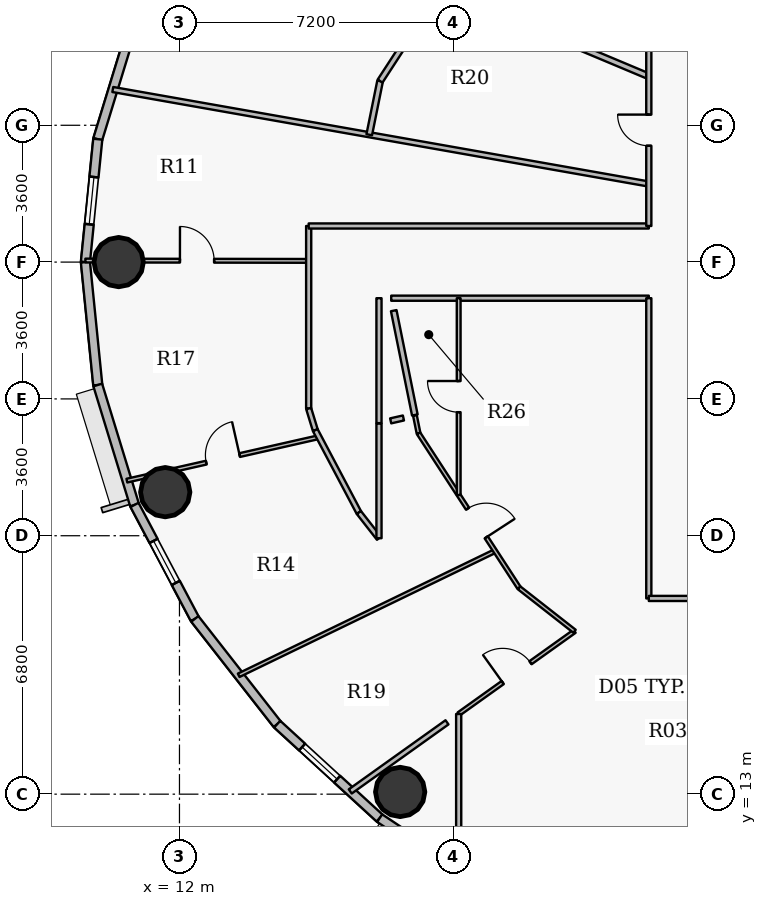
"""IFC4 building model, lengths in metres.
Left out: names, types, materials, properties, quantities, classifications, styles, units other than length and angle.
Written with IfcOpenShell. Run it as: python <this file> out.ifc"""

import sys

from ifc_helpers import new_model, si_unit, direction, frame, frame_2d, origin, origin_2d, place, context, subcontext, project, spatial, rectangle, hollow_circle, extrude, source, transform, mapped, element, fill, save


model = new_model("IFC4")
c1 = context("Model", 3, precision=1e-05, world=origin(), true_north=direction((0.0, 1.0)))
c2 = subcontext(c1, "Body", "Model", "MODEL_VIEW")
j1 = project(units=[si_unit("LENGTHUNIT", "METRE"), si_unit("PLANEANGLEUNIT", "RADIAN")], contexts=[c1])
p1 = place(None, origin())
s1 = spatial("IfcSite", under=j1, at=p1, CompositionType="ELEMENT")
p2 = place(p1, origin())
s2 = spatial("IfcBuilding", under=s1, at=p2, CompositionType="ELEMENT")
p3 = place(p2, frame((0.0, 0.0, 186.15)))
s3 = spatial("IfcBuildingStorey", under=s2, at=p3, CompositionType="ELEMENT", Elevation=186.15)
for number, where, z_axis, x_axis in (
    (1, (10.4, 27.0, 0.0), (0.0, 0.0, 1.0), (1.0, 0.0, 0.0)),
    (2, (11.625, 20.947, 0.0), (0.0, 0.0, 1.0), (1.0, 0.0, 0.0)),
    (3, (17.808, 13.058, 0.0), (0.0, 0.0, 1.0), (1.0, 0.0, 0.0)),
):
    element("IfcColumn", number, at=place(p3, frame(where, z_axis=z_axis, x_axis=x_axis)), inside=s3, PredefinedType="COLUMN", context=c2, shape_type="SweptSolid", body=[
        extrude(hollow_circle(Radius=0.65, WallThickness=0.04, at=origin_2d()), origin(), (0.0, 0.0, 1.0), 3.75),
    ])
p4 = place(p3, frame((9.85, 30.234, 0.0), z_axis=(0.0, 0.0, 1.0), x_axis=(0.293097995113, 0.956082405058, 0.0)))
e4 = element("IfcWall", 4, at=p4, inside=s3, PredefinedType="SOLIDWALL", context=c2, shape_type="SweptSolid", body=[
    extrude(rectangle(XDim=3.3, YDim=0.24, at=frame_2d((1.65, 0.0))), origin(), (0.0, 0.0, 1.0), 3.5),
])
p5 = place(p3, frame((9.525, 27.0, 0.0), z_axis=(0.0, 0.0, 1.0), x_axis=(0.100061534614, 0.994981250723, 0.0)))
e5 = element("IfcWall", 5, at=p5, inside=s3, PredefinedType="SOLIDWALL", context=c2, shape_type="SweptSolid", body=[
    extrude(rectangle(XDim=3.25, YDim=0.24, at=frame_2d((1.625, 0.0))), origin(), (0.0, 0.0, 1.0), 3.5),
])
p6 = place(p5, frame((1.0, 0.0, 0.9)))
e6 = element("IfcOpeningElement", 6, at=p6, cuts=e5, PredefinedType="OPENING", context=c2, shape_type="SweptSolid", body=[
    extrude(rectangle(XDim=1.25, YDim=1.65, at=origin_2d()), frame((0.625, 0.13, 0.825), z_axis=(0.0, -1.0, 0.0), x_axis=(1.0, 0.0, 0.0)), (0.0, 0.0, 1.0), 0.26),
])
p7 = place(p3, frame((9.85, 23.766, 0.0), z_axis=(0.0, 0.0, 1.0), x_axis=(-0.100061534614, 0.994981250723, 0.0)))
e7 = element("IfcWall", 7, at=p7, inside=s3, PredefinedType="SOLIDWALL", context=c2, shape_type="SweptSolid", body=[
    extrude(rectangle(XDim=3.25, YDim=0.24, at=frame_2d((1.625, 0.0))), origin(), (0.0, 0.0, 1.0), 3.5),
])
p8 = place(p3, frame((10.817, 20.611, 0.0), z_axis=(0.0, 0.0, 1.0), x_axis=(-0.293097995113, 0.956082405058, 0.0)))
e8 = element("IfcWall", 8, at=p8, inside=s3, PredefinedType="SOLIDWALL", context=c2, shape_type="SweptSolid", body=[
    extrude(rectangle(XDim=3.3, YDim=0.24, at=frame_2d((1.65, 0.0))), origin(), (0.0, 0.0, 1.0), 3.5),
])
p9 = place(p3, frame((12.404, 17.612, 0.0), z_axis=(0.0, 0.0, 1.0), x_axis=(-0.467586874938, 0.88394712194, 0.0)))
e9 = element("IfcWall", 9, at=p9, inside=s3, PredefinedType="SOLIDWALL", context=c2, shape_type="SweptSolid", body=[
    extrude(rectangle(XDim=3.393, YDim=0.24, at=frame_2d((1.697, 0.0))), origin(), (0.0, 0.0, 1.0), 3.5),
])
p10 = place(p9, frame((1.072, 0.0, 0.9)))
e10 = element("IfcOpeningElement", 10, at=p10, cuts=e9, PredefinedType="OPENING", context=c2, shape_type="SweptSolid", body=[
    extrude(rectangle(XDim=1.25, YDim=1.65, at=origin_2d()), frame((0.625, 0.13, 0.825), z_axis=(0.0, -1.0, 0.0), x_axis=(1.0, 0.0, 0.0)), (0.0, 0.0, 1.0), 0.26),
])
p11 = place(p3, frame((14.572, 14.842, 0.0), z_axis=(0.0, 0.0, 1.0), x_axis=(-0.616287674549, 0.787521112224, 0.0)))
e11 = element("IfcWall", 11, at=p11, inside=s3, PredefinedType="SOLIDWALL", context=c2, shape_type="SweptSolid", body=[
    extrude(rectangle(XDim=3.517, YDim=0.24, at=frame_2d((1.759, 0.0))), origin(), (0.0, 0.0, 1.0), 3.5),
])
p12 = place(p3, frame((17.268, 12.369, 0.0), z_axis=(0.0, 0.0, 1.0), x_axis=(-0.737076565834, 0.675809245349, 0.0)))
e12 = element("IfcWall", 12, at=p12, inside=s3, PredefinedType="SOLIDWALL", context=c2, shape_type="SweptSolid", body=[
    extrude(rectangle(XDim=3.658, YDim=0.24, at=frame_2d((1.829, 0.0))), origin(), (0.0, 0.0, 1.0), 3.5),
])
p13 = place(p12, frame((1.518, 0.0, 0.9)))
e13 = element("IfcOpeningElement", 13, at=p13, cuts=e12, PredefinedType="OPENING", context=c2, shape_type="SweptSolid", body=[
    extrude(rectangle(XDim=1.25, YDim=1.65, at=origin_2d()), frame((0.625, 0.13, 0.825), z_axis=(0.0, -1.0, 0.0), x_axis=(1.0, 0.0, 0.0)), (0.0, 0.0, 1.0), 0.26),
])
p14 = place(p3, frame((20.427, 10.257, 0.0), z_axis=(0.0, 0.0, 1.0), x_axis=(-0.831228998277, 0.555930168657, 0.0)))
e14 = element("IfcWall", 14, at=p14, inside=s3, PredefinedType="SOLIDWALL", context=c2, shape_type="SweptSolid", body=[
    extrude(rectangle(XDim=3.8, YDim=0.24, at=frame_2d((1.9, 0.0))), origin(), (0.0, 0.0, 1.0), 3.5),
])
p15 = place(p3, frame((9.524, 27.041, 0.0), z_axis=(0.0, 0.0, 1.0), x_axis=(0.999998818241, -0.001537373012, 0.0)))
e15 = element("IfcWall", 15, at=p15, inside=s3, PredefinedType="PARTITIONING", context=c2, shape_type="SweptSolid", body=[
    extrude(rectangle(XDim=5.876, YDim=0.1, at=frame_2d((2.938, 0.0))), origin(), (0.0, 0.0, 1.0), 2.935),
])
p16 = place(p15, frame((2.488, 0.0, 0.0)))
e16 = element("IfcOpeningElement", 16, at=p16, cuts=e15, PredefinedType="OPENING", context=c2, shape_type="SweptSolid", body=[
    extrude(rectangle(XDim=0.9, YDim=2.1, at=origin_2d()), frame((0.45, 0.06, 1.05), z_axis=(0.0, -1.0, 0.0), x_axis=(1.0, 0.0, 0.0)), (0.0, 0.0, 1.0), 0.12),
])
p17 = place(p3, frame((10.246, 31.541, 0.0), z_axis=(0.0, 0.0, 1.0), x_axis=(0.984807060168, -0.173652106936, 0.0)))
e17 = element("IfcWall", 17, at=p17, inside=s3, PredefinedType="PARTITIONING", context=c2, shape_type="SweptSolid", body=[
    extrude(rectangle(XDim=14.322, YDim=0.135, at=frame_2d((7.161, 0.0))), origin(), (0.0, 0.0, 1.0), 2.935),
])
p18 = place(p3, frame((10.616, 21.25, 0.0), z_axis=(0.0, 0.0, 1.0), x_axis=(0.975289939743, 0.220928797208, 0.0)))
e18 = element("IfcWall", 18, at=p18, inside=s3, PredefinedType="PARTITIONING", context=c2, shape_type="SweptSolid", body=[
    extrude(rectangle(XDim=5.183, YDim=0.1, at=frame_2d((2.591, 0.0))), origin(), (0.0, 0.0, 1.0), 2.935),
])
p19 = place(p18, frame((2.141, 0.0, 0.0)))
e19 = element("IfcOpeningElement", 19, at=p19, cuts=e18, PredefinedType="OPENING", context=c2, shape_type="SweptSolid", body=[
    extrude(rectangle(XDim=0.9, YDim=2.1, at=origin_2d()), frame((0.45, 0.06, 1.05), z_axis=(0.0, -1.0, 0.0), x_axis=(1.0, 0.0, 0.0)), (0.0, 0.0, 1.0), 0.12),
])
p20 = place(p3, frame((12.7, 36.775, 0.0), z_axis=(0.0, 0.0, 1.0), x_axis=(0.922134788074, -0.386868753745, 0.0)))
e20 = element("IfcWall", 20, at=p20, inside=s3, PredefinedType="PARTITIONING", context=c2, shape_type="SweptSolid", body=[
    extrude(rectangle(XDim=12.633, YDim=0.15, at=frame_2d((6.317, 0.0))), origin(), (0.0, 0.0, 1.0), 2.935),
])
p21 = place(p20, frame((2.834, 0.0, 0.0)))
e21 = element("IfcOpeningElement", 21, at=p21, cuts=e20, PredefinedType="OPENING", context=c2, shape_type="SweptSolid", body=[
    extrude(rectangle(XDim=1.05, YDim=2.15, at=origin_2d()), frame((0.525, 0.085, 1.075), z_axis=(0.0, -1.0, 0.0), x_axis=(1.0, 0.0, 0.0)), (0.0, 0.0, 1.0), 0.17),
])
p22 = place(p3, frame((13.559, 16.128, 0.0), z_axis=(0.0, 0.0, 1.0), x_axis=(0.899957370901, 0.43597790146, 0.0)))
e22 = element("IfcWall", 22, at=p22, inside=s3, PredefinedType="PARTITIONING", context=c2, shape_type="SweptSolid", body=[
    extrude(rectangle(XDim=7.498, YDim=0.1, at=frame_2d((3.749, 0.0))), origin(), (0.0, 0.0, 1.0), 2.935),
])
p23 = place(p3, frame((15.4, 23.146, 0.0), z_axis=(0.0, 0.0, 1.0), x_axis=(0.0, 1.0, 0.0)))
e23 = element("IfcWall", 23, at=p23, inside=s3, PredefinedType="PARTITIONING", context=c2, shape_type="SweptSolid", body=[
    extrude(rectangle(XDim=4.804, YDim=0.135, at=frame_2d((2.402, 0.0))), origin(), (0.0, 0.0, 1.0), 2.935),
])
p24 = place(p3, frame((15.4, 23.146, 0.0), z_axis=(0.0, 0.0, 1.0), x_axis=(0.293335154151, -0.956009669061, 0.0)))
e24 = element("IfcWall", 24, at=p24, inside=s3, PredefinedType="PARTITIONING", context=c2, shape_type="SweptSolid", body=[
    extrude(rectangle(XDim=0.594, YDim=0.135, at=frame_2d((0.297, 0.0))), origin(), (0.0, 0.0, 1.0), 3.5),
])
p25 = place(p3, frame((15.4, 27.95, 0.0), z_axis=(0.0, 0.0, 1.0), x_axis=(1.0, 0.0, 0.0)))
e25 = element("IfcWall", 25, at=p25, inside=s3, PredefinedType="PARTITIONING", context=c2, shape_type="SweptSolid", body=[
    extrude(rectangle(XDim=8.95, YDim=0.135, at=frame_2d((4.475, 0.0))), origin(), (0.0, 0.0, 1.0), 3.5),
])
p26 = place(p3, frame((15.574, 22.578, 0.0), z_axis=(0.0, 0.0, 1.0), x_axis=(0.467613130075, -0.883933233102, 0.0)))
e26 = element("IfcWall", 26, at=p26, inside=s3, PredefinedType="PARTITIONING", context=c2, shape_type="SweptSolid", body=[
    extrude(rectangle(XDim=2.451, YDim=0.135, at=frame_2d((1.226, 0.0))), origin(), (0.0, 0.0, 1.0), 2.935),
])
p27 = place(p3, frame((16.72, 20.411, 0.0), z_axis=(0.0, 0.0, 1.0), x_axis=(0.616377221056, -0.787451027914, 0.0)))
e27 = element("IfcWall", 27, at=p27, inside=s3, PredefinedType="PARTITIONING", context=c2, shape_type="SweptSolid", body=[
    extrude(rectangle(XDim=0.859, YDim=0.135, at=frame_2d((0.43, 0.0))), origin(), (0.0, 0.0, 1.0), 3.5),
])
p28 = place(p3, frame((16.994, 30.351, 0.0), z_axis=(0.0, 0.0, 1.0), x_axis=(0.198136589313, 0.98017441916, 0.0)))
e28 = element("IfcWall", 28, at=p28, inside=s3, PredefinedType="PARTITIONING", context=c2, shape_type="SweptSolid", body=[
    extrude(rectangle(XDim=1.44, YDim=0.15, at=frame_2d((0.72, 0.0))), origin(), (0.0, 0.0, 1.0), 3.5),
])
p29 = place(p3, frame((17.25, 19.734, 0.0), z_axis=(0.0, 0.0, 1.0), x_axis=(0.0, 1.0, 0.0)))
e29 = element("IfcWall", 29, at=p29, inside=s3, PredefinedType="PARTITIONING", context=c2, shape_type="SweptSolid", body=[
    extrude(rectangle(XDim=3.018, YDim=0.135, at=frame_2d((1.509, 0.0))), origin(), (0.0, 0.0, 1.0), 2.935),
])
p30 = place(p3, frame((17.279, 31.763, 0.0), z_axis=(0.0, 0.0, 1.0), x_axis=(0.545388220317, 0.8381835653, 0.0)))
e30 = element("IfcWall", 30, at=p30, inside=s3, PredefinedType="PARTITIONING", context=c2, shape_type="SweptSolid", body=[
    extrude(rectangle(XDim=2.897, YDim=0.15, at=frame_2d((1.448, 0.0))), origin(), (0.0, 0.0, 1.0), 2.935),
])
p31 = place(p3, frame((17.572, 26.05, 0.0), z_axis=(0.0, 0.0, 1.0), x_axis=(1.0, 0.0, 0.0)))
e31 = element("IfcWall", 31, at=p31, inside=s3, PredefinedType="PARTITIONING", context=c2, shape_type="SweptSolid", body=[
    extrude(rectangle(XDim=6.778, YDim=0.135, at=frame_2d((3.389, 0.0))), origin(), (0.0, 0.0, 1.0), 3.5),
])
p32 = place(p3, frame((18.196, 22.967, 0.0), z_axis=(0.0, 0.0, 1.0), x_axis=(0.197965751338, -0.980208937573, 0.0)))
e32 = element("IfcWall", 32, at=p32, inside=s3, PredefinedType="PARTITIONING", context=c2, shape_type="SweptSolid", body=[
    extrude(rectangle(XDim=0.482, YDim=0.1, at=frame_2d((0.241, 0.0))), origin(), (0.0, 0.0, 1.0), 2.935),
])
p33 = place(p3, frame((18.291, 22.494, 0.0), z_axis=(0.0, 0.0, 1.0), x_axis=(0.545382906853, -0.838187022634, 0.0)))
e33 = element("IfcWall", 33, at=p33, inside=s3, PredefinedType="PARTITIONING", context=c2, shape_type="SweptSolid", body=[
    extrude(rectangle(XDim=4.849, YDim=0.1, at=frame_2d((2.425, 0.0))), origin(), (0.0, 0.0, 1.0), 2.935),
])
p34 = place(p33, frame((2.365, 0.0, 0.0)))
e34 = element("IfcOpeningElement", 34, at=p34, cuts=e33, PredefinedType="OPENING", context=c2, shape_type="SweptSolid", body=[
    extrude(rectangle(XDim=0.9, YDim=2.1, at=origin_2d()), frame((0.45, 0.06, 1.05), z_axis=(0.0, -1.0, 0.0), x_axis=(1.0, 0.0, 0.0)), (0.0, 0.0, 1.0), 0.12),
])
p35 = place(p3, frame((19.347, 15.11, 0.0), z_axis=(0.0, 0.0, 1.0), x_axis=(0.813856749582, 0.581065565285, 0.0)))
e35 = element("IfcWall", 35, at=p35, inside=s3, PredefinedType="PARTITIONING", context=c2, shape_type="SweptSolid", body=[
    extrude(rectangle(XDim=3.746, YDim=0.1, at=frame_2d((1.873, 0.0))), origin(), (0.0, 0.0, 1.0), 3.5),
])
p36 = place(p35, frame((1.423, 0.0, 0.0)))
e36 = element("IfcOpeningElement", 36, at=p36, cuts=e35, PredefinedType="OPENING", context=c2, shape_type="SweptSolid", body=[
    extrude(rectangle(XDim=0.9, YDim=2.1, at=origin_2d()), frame((0.45, 0.06, 1.05), z_axis=(0.0, -1.0, 0.0), x_axis=(1.0, 0.0, 0.0)), (0.0, 0.0, 1.0), 0.12),
])
p37 = place(p3, frame((19.347, 20.871, 0.0), z_axis=(0.0, 0.0, 1.0), x_axis=(0.0, 1.0, 0.0)))
e37 = element("IfcWall", 37, at=p37, inside=s3, PredefinedType="PARTITIONING", context=c2, shape_type="SweptSolid", body=[
    extrude(rectangle(XDim=5.179, YDim=0.1, at=frame_2d((2.589, 0.0))), origin(), (0.0, 0.0, 1.0), 2.935),
])
p38 = place(p37, frame((2.179, 0.0, 0.0)))
e38 = element("IfcOpeningElement", 38, at=p38, cuts=e37, PredefinedType="OPENING", context=c2, shape_type="SweptSolid", body=[
    extrude(rectangle(XDim=0.82, YDim=2.1, at=origin_2d()), frame((0.41, 0.06, 1.05), z_axis=(0.0, -1.0, 0.0), x_axis=(1.0, 0.0, 0.0)), (0.0, 0.0, 1.0), 0.12),
])
p39 = place(p3, frame((20.936, 18.429, 0.0), z_axis=(0.0, 0.0, 1.0), x_axis=(0.787377174631, -0.616471560472, 0.0)))
e39 = element("IfcWall", 39, at=p39, inside=s3, PredefinedType="PARTITIONING", context=c2, shape_type="SweptSolid", body=[
    extrude(rectangle(XDim=1.854, YDim=0.1, at=frame_2d((0.927, 0.0))), origin(), (0.0, 0.0, 1.0), 3.5),
])
p40 = place(p3, frame((24.35, 18.15, 0.0), z_axis=(0.0, 0.0, 1.0), x_axis=(0.0, 1.0, 0.0)))
e40 = element("IfcWall", 40, at=p40, inside=s3, PredefinedType="PARTITIONING", context=c2, shape_type="SweptSolid", body=[
    extrude(rectangle(XDim=7.9, YDim=0.135, at=frame_2d((3.95, 0.0))), origin(), (0.0, 0.0, 1.0), 2.935),
])
p41 = place(p3, frame((24.35, 18.15, 0.0), z_axis=(0.0, 0.0, 1.0), x_axis=(1.0, 0.0, 0.0)))
e41 = element("IfcWall", 41, at=p41, inside=s3, PredefinedType="PARTITIONING", context=c2, shape_type="SweptSolid", body=[
    extrude(rectangle(XDim=9.109, YDim=0.135, at=frame_2d((4.554, 0.0))), origin(), (0.0, 0.0, 1.0), 2.935),
])
p42 = place(p41, frame((4.054, 0.0, 0.0)))
e42 = element("IfcOpeningElement", 42, at=p42, cuts=e41, PredefinedType="OPENING", context=c2, shape_type="SweptSolid", body=[
    extrude(rectangle(XDim=1.0, YDim=2.15, at=origin_2d()), frame((0.5, 0.078, 1.075), z_axis=(0.0, -1.0, 0.0), x_axis=(1.0, 0.0, 0.0)), (0.0, 0.0, 1.0), 0.155),
])
p43 = place(p3, frame((24.35, 27.95, 0.0), z_axis=(0.0, 0.0, 1.0), x_axis=(0.0, 1.0, 0.0)))
e43 = element("IfcWall", 43, at=p43, inside=s3, PredefinedType="PARTITIONING", context=c2, shape_type="SweptSolid", body=[
    extrude(rectangle(XDim=7.9, YDim=0.135, at=frame_2d((3.95, 0.0))), origin(), (0.0, 0.0, 1.0), 2.935),
])
p44 = place(p43, frame((2.111, 0.0, 0.0)))
e44 = element("IfcOpeningElement", 44, at=p44, cuts=e43, PredefinedType="OPENING", context=c2, shape_type="SweptSolid", body=[
    extrude(rectangle(XDim=0.82, YDim=2.1, at=origin_2d()), frame((0.41, 0.078, 1.05), z_axis=(0.0, -1.0, 0.0), x_axis=(1.0, 0.0, 0.0)), (0.0, 0.0, 1.0), 0.155),
])
p45 = place(p3, frame((24.497, 8.38, 0.0), z_axis=(0.0, 0.0, 1.0), x_axis=(0.525599261466, 0.850732282417, 0.0)))
e45 = element("IfcWall", 45, at=p45, inside=s3, PredefinedType="PARTITIONING", context=c2, shape_type="SweptSolid", body=[
    extrude(rectangle(XDim=6.645, YDim=0.1, at=frame_2d((3.322, 0.0))), origin(), (0.0, 0.0, 1.0), 2.935),
])
p46 = place(p45, frame((2.872, 0.0, 0.0)))
e46 = element("IfcOpeningElement", 46, at=p46, cuts=e45, PredefinedType="OPENING", context=c2, shape_type="SweptSolid", body=[
    extrude(rectangle(XDim=0.9, YDim=2.1, at=origin_2d()), frame((0.45, 0.06, 1.05), z_axis=(0.0, -1.0, 0.0), x_axis=(1.0, 0.0, 0.0)), (0.0, 0.0, 1.0), 0.12),
])
p47 = place(p3, frame((17.25, 26.05, 0.0), z_axis=(0.0, 0.0, 1.0), x_axis=(0.0, -1.0, 0.0)))
e47 = element("IfcWall", 47, at=p47, inside=s3, PredefinedType="PARTITIONING", context=c2, shape_type="SweptSolid", body=[
    extrude(rectangle(XDim=3.288, YDim=0.135, at=frame_2d((1.644, 0.0))), origin(), (0.0, 0.0, 1.0), 3.125),
])
p48 = place(p3, frame((19.347, 10.973, 0.0), z_axis=(0.0, 0.0, 1.0), x_axis=(0.0, 1.0, 0.0)))
e48 = element("IfcWall", 48, at=p48, inside=s3, PredefinedType="PARTITIONING", context=c2, shape_type="SweptSolid", body=[
    extrude(rectangle(XDim=4.137, YDim=0.135, at=frame_2d((2.068, 0.0))), origin(), (0.0, 0.0, 1.0), 2.935),
])
p49 = place(p3, frame((17.558, 22.822, 0.0), z_axis=(0.0, 0.0, 1.0), x_axis=(0.975362278784, 0.220609213601, 0.0)))
e49 = element("IfcWall", 49, at=p49, inside=s3, PredefinedType="PARTITIONING", context=c2, shape_type="SweptSolid", body=[
    extrude(rectangle(XDim=0.344, YDim=0.135, at=frame_2d((0.172, 0.0))), origin(), (0.0, 0.0, 1.0), 3.125),
])
p50 = place(p3, frame((19.04, 14.89, 0.0), z_axis=(0.0, 0.0, 1.0), x_axis=(-0.813828377049, -0.5811053026, 0.0)))
e50 = element("IfcWall", 50, at=p50, inside=s3, PredefinedType="PARTITIONING", context=c2, shape_type="SweptSolid", body=[
    extrude(rectangle(XDim=3.128, YDim=0.135, at=frame_2d((1.564, 0.0))), origin(), (0.0, 0.0, 1.0), 2.935),
])
p51 = place(p3, frame((18.194, 22.977, 0.0), z_axis=(0.0, 0.0, 1.0), x_axis=(-0.19826083806, 0.980149294797, 0.0)))
e51 = element("IfcWall", 51, at=p51, inside=s3, PredefinedType="PARTITIONING", context=c2, shape_type="SweptSolid", body=[
    extrude(rectangle(XDim=2.802, YDim=0.15, at=frame_2d((1.401, 0.0))), origin(), (0.0, 0.0, 1.0), 3.5),
])
m1 = source(origin(), c2, "Body", "SweptSolid", [
    extrude(rectangle(XDim=1.25, YDim=1.65, at=origin_2d()), frame((0.625, 0.03, 0.825), z_axis=(0.0, -1.0, 0.0), x_axis=(1.0, 0.0, 0.0)), (0.0, 0.0, 1.0), 0.06),
])
p52 = place(p13, origin())
e52 = element("IfcWindow", 52, at=p52, inside=s3, PartitioningType="SINGLE_PANEL", PredefinedType="WINDOW", context=c2, shape_type="MappedRepresentation", body=[
    mapped(m1, transform((0.0, 0.0, 0.0), x_axis=(1.0, 0.0, 0.0), y_axis=(0.0, 1.0, 0.0), z_axis=(0.0, 0.0, 1.0), scale=1.0)),
])
fill(e13, e52)
p53 = place(p6, origin())
e53 = element("IfcWindow", 53, at=p53, inside=s3, PartitioningType="SINGLE_PANEL", PredefinedType="WINDOW", context=c2, shape_type="MappedRepresentation", body=[
    mapped(m1, transform((0.0, 0.0, 0.0), x_axis=(1.0, 0.0, 0.0), y_axis=(0.0, 1.0, 0.0), z_axis=(0.0, 0.0, 1.0), scale=1.0)),
])
fill(e6, e53)
p54 = place(p10, origin())
e54 = element("IfcWindow", 54, at=p54, inside=s3, PartitioningType="SINGLE_PANEL", PredefinedType="WINDOW", context=c2, shape_type="MappedRepresentation", body=[
    mapped(m1, transform((0.0, 0.0, 0.0), x_axis=(1.0, 0.0, 0.0), y_axis=(0.0, 1.0, 0.0), z_axis=(0.0, 0.0, 1.0), scale=1.0)),
])
fill(e10, e54)
m2 = source(origin(), c2, "Body", "SweptSolid", [
    extrude(rectangle(XDim=0.9, YDim=2.1, at=origin_2d()), frame((0.45, 0.025, 1.05), z_axis=(0.0, -1.0, 0.0), x_axis=(1.0, 0.0, 0.0)), (0.0, 0.0, 1.0), 0.05),
])
p55 = place(p34, origin())
e55 = element("IfcDoor", 55, at=p55, inside=s3, OperationType="SINGLE_SWING_RIGHT", PredefinedType="DOOR", context=c2, shape_type="MappedRepresentation", body=[
    mapped(m2, transform((0.0, 0.0, 0.0), x_axis=(1.0, 0.0, 0.0), y_axis=(0.0, 1.0, 0.0), z_axis=(0.0, 0.0, 1.0), scale=1.0)),
])
fill(e34, e55)
p56 = place(p36, origin())
e56 = element("IfcDoor", 56, at=p56, inside=s3, OperationType="SINGLE_SWING_LEFT", PredefinedType="DOOR", context=c2, shape_type="MappedRepresentation", body=[
    mapped(m2, transform((0.0, 0.0, 0.0), x_axis=(1.0, 0.0, 0.0), y_axis=(0.0, 1.0, 0.0), z_axis=(0.0, 0.0, 1.0), scale=1.0)),
])
fill(e36, e56)
m3 = source(origin(), c2, "Body", "SweptSolid", [
    extrude(rectangle(XDim=0.82, YDim=2.1, at=origin_2d()), frame((0.41, 0.025, 1.05), z_axis=(0.0, -1.0, 0.0), x_axis=(1.0, 0.0, 0.0)), (0.0, 0.0, 1.0), 0.05),
])
p57 = place(p38, origin())
e57 = element("IfcDoor", 57, at=p57, inside=s3, OperationType="SINGLE_SWING_RIGHT", PredefinedType="DOOR", context=c2, shape_type="MappedRepresentation", body=[
    mapped(m3, transform((0.0, 0.0, 0.0), x_axis=(1.0, 0.0, 0.0), y_axis=(0.0, 1.0, 0.0), z_axis=(0.0, 0.0, 1.0), scale=1.0)),
])
fill(e38, e57)
p58 = place(p19, origin())
e58 = element("IfcDoor", 58, at=p58, inside=s3, OperationType="SINGLE_SWING_RIGHT", PredefinedType="DOOR", context=c2, shape_type="MappedRepresentation", body=[
    mapped(m2, transform((0.0, 0.0, 0.0), x_axis=(1.0, 0.0, 0.0), y_axis=(0.0, 1.0, 0.0), z_axis=(0.0, 0.0, 1.0), scale=1.0)),
])
fill(e19, e58)
p59 = place(p16, origin())
e59 = element("IfcDoor", 59, at=p59, inside=s3, OperationType="SINGLE_SWING_LEFT", PredefinedType="DOOR", context=c2, shape_type="MappedRepresentation", body=[
    mapped(m2, transform((0.0, 0.0, 0.0), x_axis=(1.0, 0.0, 0.0), y_axis=(0.0, 1.0, 0.0), z_axis=(0.0, 0.0, 1.0), scale=1.0)),
])
fill(e16, e59)
p60 = place(p44, origin())
e60 = element("IfcDoor", 60, at=p60, inside=s3, OperationType="SINGLE_SWING_RIGHT", PredefinedType="DOOR", context=c2, shape_type="MappedRepresentation", body=[
    mapped(m3, transform((0.0, 0.0, 0.0), x_axis=(1.0, 0.0, 0.0), y_axis=(0.0, 1.0, 0.0), z_axis=(0.0, 0.0, 1.0), scale=1.0)),
])
fill(e44, e60)
save(model, sys.argv[1])
